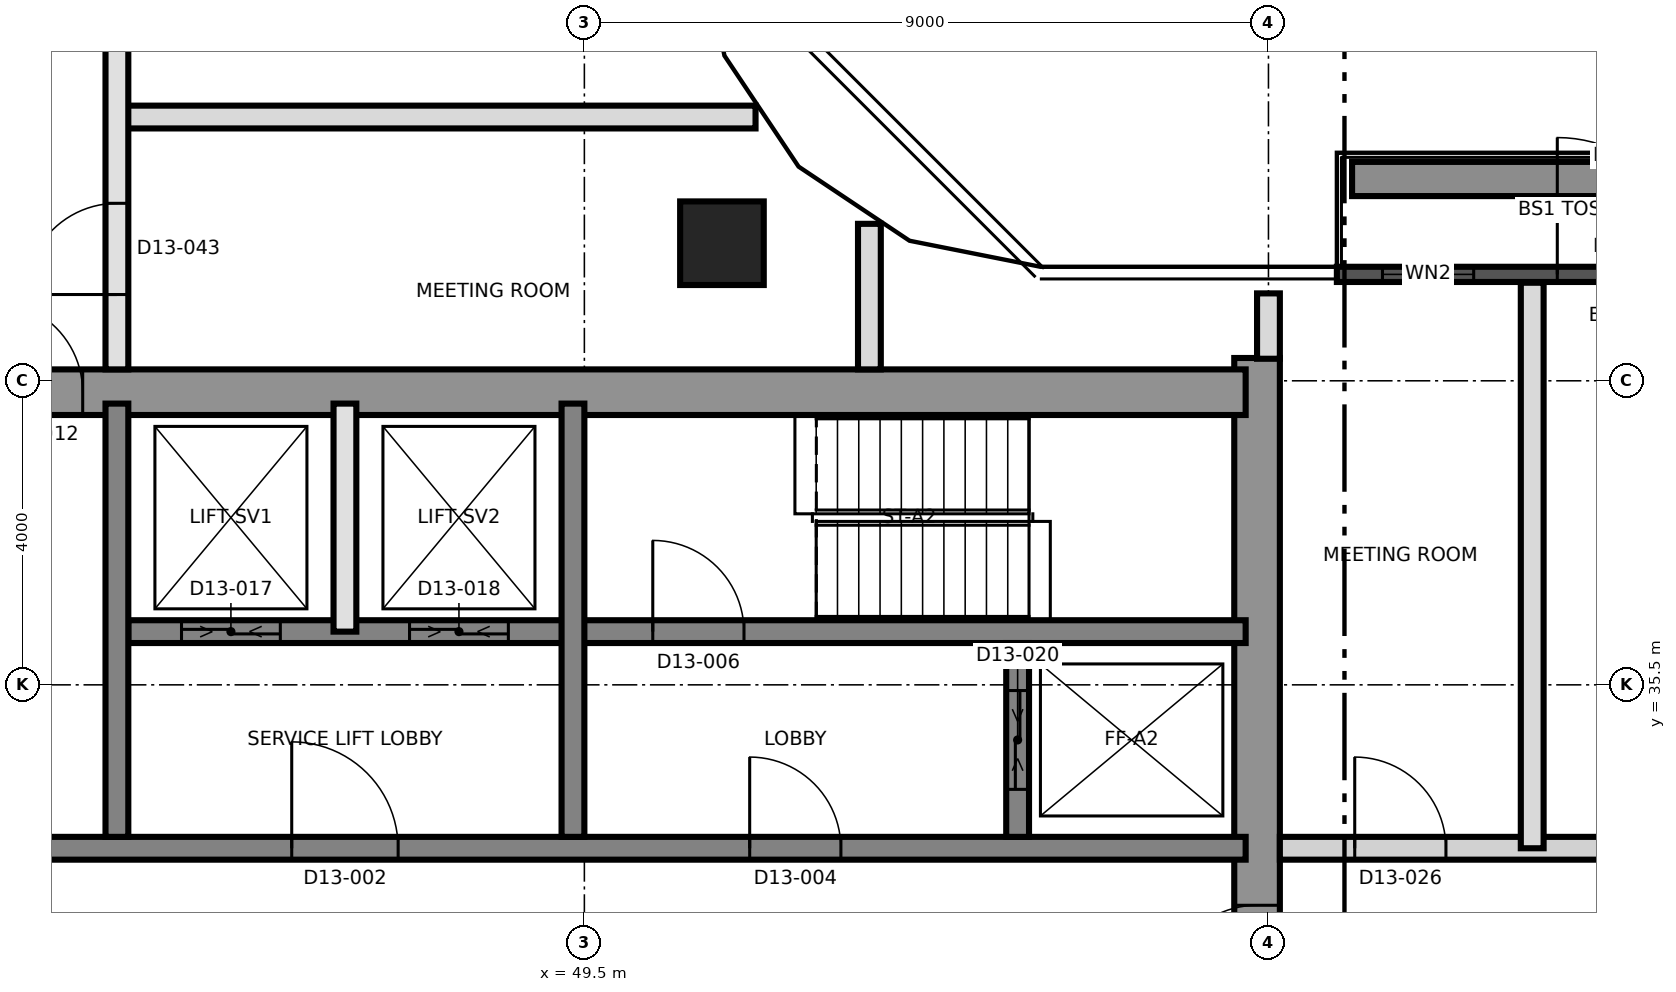
"""IFC4 building model, lengths in metres.
Left out: names, types, materials, properties, quantities, classifications, styles, units other than length and angle.
Written with IfcOpenShell. Run it as: python <this file> out.ifc"""

import sys

from ifc_helpers import new_model, si_unit, direction, frame, frame_2d, origin, origin_2d, place, context, subcontext, project, spatial, rectangle, extrude, element, fill, save


model = new_model("IFC4")
c1 = context("Model", 3, precision=1e-05, world=origin(), true_north=direction((0.0, 1.0)))
c2 = subcontext(c1, "Body", "Model", "MODEL_VIEW")
j1 = project(units=[si_unit("LENGTHUNIT", "METRE"), si_unit("PLANEANGLEUNIT", "RADIAN")], contexts=[c1])
p1 = place(None, origin())
s1 = spatial("IfcSite", under=j1, at=p1, CompositionType="ELEMENT")
p2 = place(p1, origin())
s2 = spatial("IfcBuilding", under=s1, at=p2, CompositionType="ELEMENT")
p3 = place(p2, frame((0.0, 0.0, 145.9)))
s3 = spatial("IfcBuildingStorey", under=s2, at=p3, CompositionType="ELEMENT", Elevation=145.9)
p4 = place(p3, frame((58.35, 21.2, 0.0), z_axis=(0.0, 0.0, 1.0), x_axis=(0.0, 1.0, 0.0)))
e1 = element("IfcWall", 1, at=p4, inside=s3, PredefinedType="SHEAR", context=c2, shape_type="SweptSolid", body=[
    extrude(rectangle(XDim=18.6, YDim=0.6, at=frame_2d((9.3, 0.0))), origin(), (0.0, 0.0, 1.0), 3.7),
])
p5 = place(p4, frame((10.2, 0.0, 0.0)))
e2 = element("IfcOpeningElement", 2, at=p5, cuts=e1, PredefinedType="OPENING", context=c2, shape_type="SweptSolid", body=[
    extrude(rectangle(XDim=1.2, YDim=2.1, at=frame_2d((0.6, 1.05))), frame((0.0, 0.31, 0.0), z_axis=(0.0, -1.0, 0.0), x_axis=(1.0, 0.0, 0.0)), (0.0, 0.0, 1.0), 0.62),
])
p6 = place(p3, frame((31.2, 39.35, 0.0), z_axis=(0.0, 0.0, 1.0), x_axis=(1.0, 0.0, 0.0)))
e3 = element("IfcWall", 3, at=p6, inside=s3, PredefinedType="SHEAR", context=c2, shape_type="SweptSolid", body=[
    extrude(rectangle(XDim=27.0, YDim=0.6, at=frame_2d((13.5, 0.0))), origin(), (0.0, 0.0, 1.0), 3.7),
])
p7 = place(p6, frame((10.5, 0.0, 0.0)))
e4 = element("IfcOpeningElement", 4, at=p7, cuts=e3, PredefinedType="OPENING", context=c2, shape_type="SweptSolid", body=[
    extrude(rectangle(XDim=1.2, YDim=2.1, at=frame_2d((0.6, 1.05))), frame((0.0, 0.31, 0.0), z_axis=(0.0, -1.0, 0.0), x_axis=(1.0, 0.0, 0.0)), (0.0, 0.0, 1.0), 0.62),
])
p8 = place(p3, frame((31.8, 33.35, 0.0), z_axis=(0.0, 0.0, 1.0), x_axis=(1.0, 0.0, 0.0)))
e5 = element("IfcWall", 5, at=p8, inside=s3, PredefinedType="SHEAR", context=c2, shape_type="SweptSolid", body=[
    extrude(rectangle(XDim=26.4, YDim=0.3, at=frame_2d((13.2, 0.0))), origin(), (0.0, 0.0, 1.0), 3.7),
])
p9 = place(p8, frame((13.85, 0.0, 0.0)))
e6 = element("IfcOpeningElement", 6, at=p9, cuts=e5, PredefinedType="OPENING", context=c2, shape_type="SweptSolid", body=[
    extrude(rectangle(XDim=1.4, YDim=2.1, at=frame_2d((0.7, 1.05))), frame((0.0, 0.16, 0.0), z_axis=(0.0, -1.0, 0.0), x_axis=(1.0, 0.0, 0.0)), (0.0, 0.0, 1.0), 0.32),
])
p10 = place(p8, frame((5.325, 0.0, 0.0)))
e7 = element("IfcOpeningElement", 7, at=p10, cuts=e5, PredefinedType="OPENING", context=c2, shape_type="SweptSolid", body=[
    extrude(rectangle(XDim=1.2, YDim=2.1, at=frame_2d((0.6, 1.05))), frame((0.0, 0.16, 0.0), z_axis=(0.0, -1.0, 0.0), x_axis=(1.0, 0.0, 0.0)), (0.0, 0.0, 1.0), 0.32),
])
p11 = place(p8, frame((19.875, 0.0, 0.0)))
e8 = element("IfcOpeningElement", 8, at=p11, cuts=e5, PredefinedType="OPENING", context=c2, shape_type="SweptSolid", body=[
    extrude(rectangle(XDim=1.2, YDim=2.1, at=frame_2d((0.6, 1.05))), frame((0.0, 0.16, 0.0), z_axis=(0.0, -1.0, 0.0), x_axis=(1.0, 0.0, 0.0)), (0.0, 0.0, 1.0), 0.32),
])
p12 = place(p3, frame((43.5, 36.2, 0.0), z_axis=(0.0, 0.0, 1.0), x_axis=(1.0, 0.0, 0.0)))
e9 = element("IfcWall", 9, at=p12, inside=s3, PredefinedType="SHEAR", context=c2, shape_type="SweptSolid", body=[
    extrude(rectangle(XDim=14.7, YDim=0.3, at=frame_2d((7.35, 0.0))), origin(), (0.0, 0.0, 1.0), 3.7),
])
p13 = place(p12, frame((6.9, 0.0, 0.0)))
e10 = element("IfcOpeningElement", 10, at=p13, cuts=e9, PredefinedType="OPENING", context=c2, shape_type="SweptSolid", body=[
    extrude(rectangle(XDim=1.2, YDim=2.1, at=frame_2d((0.6, 1.05))), frame((0.0, 0.16, 0.0), z_axis=(0.0, -1.0, 0.0), x_axis=(1.0, 0.0, 0.0)), (0.0, 0.0, 1.0), 0.32),
])
p14 = place(p12, frame((0.7, 0.0, 0.0)))
e11 = element("IfcOpeningElement", 11, at=p14, cuts=e9, PredefinedType="OPENING", context=c2, shape_type="SweptSolid", body=[
    extrude(rectangle(XDim=1.3, YDim=2.4, at=frame_2d((0.65, 1.2))), frame((0.0, 0.16, 0.0), z_axis=(0.0, -1.0, 0.0), x_axis=(1.0, 0.0, 0.0)), (0.0, 0.0, 1.0), 0.32),
])
p15 = place(p12, frame((3.7, 0.0, 0.0)))
e12 = element("IfcOpeningElement", 12, at=p15, cuts=e9, PredefinedType="OPENING", context=c2, shape_type="SweptSolid", body=[
    extrude(rectangle(XDim=1.3, YDim=2.4, at=frame_2d((0.65, 1.2))), frame((0.0, 0.16, 0.0), z_axis=(0.0, -1.0, 0.0), x_axis=(1.0, 0.0, 0.0)), (0.0, 0.0, 1.0), 0.32),
])
for number, where, z_axis, x_axis in (
    (13, (43.35, 33.5, 0.0), (0.0, 0.0, 1.0), (0.0, 1.0, 0.0)),
    (14, (49.35, 33.5, 0.0), (0.0, 0.0, 1.0), (0.0, 1.0, 0.0)),
):
    element("IfcWall", number, at=place(p3, frame(where, z_axis=z_axis, x_axis=x_axis)), inside=s3, PredefinedType="SHEAR", context=c2, shape_type="SweptSolid", body=[
        extrude(rectangle(XDim=5.7, YDim=0.3, at=frame_2d((2.85, 0.0))), origin(), (0.0, 0.0, 1.0), 3.7),
    ])
p16 = place(p3, frame((55.2, 33.5, 0.0), z_axis=(0.0, 0.0, 1.0), x_axis=(0.0, 1.0, 0.0)))
e15 = element("IfcWall", 15, at=p16, inside=s3, PredefinedType="SHEAR", context=c2, shape_type="SweptSolid", body=[
    extrude(rectangle(XDim=2.55, YDim=0.3, at=frame_2d((1.275, 0.0))), origin(), (0.0, 0.0, 1.0), 3.7),
])
p17 = place(p16, frame((0.625, 0.0, 0.0)))
e16 = element("IfcOpeningElement", 16, at=p17, cuts=e15, PredefinedType="OPENING", context=c2, shape_type="SweptSolid", body=[
    extrude(rectangle(XDim=1.3, YDim=2.4, at=frame_2d((0.65, 1.2))), frame((0.0, 0.16, 0.0), z_axis=(0.0, -1.0, 0.0), x_axis=(1.0, 0.0, 0.0)), (0.0, 0.0, 1.0), 0.32),
])
p18 = place(p3, frame((51.31, 41.31, 0.0), z_axis=(0.0, 0.0, 1.0), x_axis=(1.0, 0.0, 0.0)))
e17 = element("IfcColumn", 17, at=p18, inside=s3, PredefinedType="COLUMN", context=c2, shape_type="SweptSolid", body=[
    extrude(rectangle(XDim=1.1, YDim=1.1, at=origin_2d()), origin(), (0.0, 0.0, 1.0), 3.7),
])
p19 = place(p3, frame((63.0, 42.155, 0.0), z_axis=(0.0, 0.0, 1.0), x_axis=(1.0, 0.0, 0.0)))
e18 = element("IfcWall", 18, at=p19, inside=s3, PredefinedType="SOLIDWALL", context=c2, shape_type="SweptSolid", body=[
    extrude(rectangle(XDim=6.8, YDim=0.45, at=origin_2d()), origin(), (0.0, 0.0, 1.0), 1.0),
])
p20 = place(p3, frame((59.4, 40.9, 0.0), z_axis=(0.0, 0.0, 1.0), x_axis=(1.0, 0.0, 0.0)))
e19 = element("IfcWall", 19, at=p20, inside=s3, PredefinedType="SOLIDWALL", context=c2, shape_type="SweptSolid", body=[
    extrude(rectangle(XDim=7.2, YDim=0.2, at=frame_2d((3.6, 0.0))), origin(), (0.0, 0.0, 1.0), 3.4),
])
p21 = place(p20, frame((2.9, 0.0, 0.0)))
e20 = element("IfcOpeningElement", 20, at=p21, cuts=e19, PredefinedType="OPENING", context=c2, shape_type="SweptSolid", body=[
    extrude(rectangle(XDim=1.8, YDim=2.4, at=frame_2d((0.9, 1.2))), frame((0.0, 0.11, 0.0), z_axis=(0.0, -1.0, 0.0), x_axis=(1.0, 0.0, 0.0)), (0.0, 0.0, 1.0), 0.22),
])
p22 = place(p20, frame((5.4, 0.0, 0.9)))
e21 = element("IfcOpeningElement", 21, at=p22, cuts=e19, PredefinedType="OPENING", context=c2, shape_type="SweptSolid", body=[
    extrude(rectangle(XDim=1.2, YDim=2.1, at=frame_2d((0.6, 1.05))), frame((0.0, 0.11, 0.0), z_axis=(0.0, -1.0, 0.0), x_axis=(1.0, 0.0, 0.0)), (0.0, 0.0, 1.0), 0.22),
])
p23 = place(p20, frame((0.6, 0.0, 0.9)))
e22 = element("IfcOpeningElement", 22, at=p23, cuts=e19, PredefinedType="OPENING", context=c2, shape_type="SweptSolid", body=[
    extrude(rectangle(XDim=1.2, YDim=2.1, at=frame_2d((0.6, 1.05))), frame((0.0, 0.11, 0.0), z_axis=(0.0, -1.0, 0.0), x_axis=(1.0, 0.0, 0.0)), (0.0, 0.0, 1.0), 0.22),
])
p24 = place(p3, frame((46.35, 36.2, 0.0), z_axis=(0.0, 0.0, 1.0), x_axis=(0.0, 1.0, 0.0)))
e23 = element("IfcWall", 23, at=p24, inside=s3, PredefinedType="SOLIDWALL", context=c2, shape_type="SweptSolid", body=[
    extrude(rectangle(XDim=3.0, YDim=0.3, at=frame_2d((1.5, 0.0))), origin(), (0.0, 0.0, 1.0), 3.4),
])
p25 = place(p3, frame((58.65, 33.35, 0.0), z_axis=(0.0, 0.0, 1.0), x_axis=(1.0, 0.0, 0.0)))
e24 = element("IfcWall", 24, at=p25, inside=s3, PredefinedType="PARTITIONING", context=c2, shape_type="SweptSolid", body=[
    extrude(rectangle(XDim=26.68, YDim=0.3, at=frame_2d((13.34, 0.0))), origin(), (0.0, 0.0, 1.0), 3.3),
])
p26 = place(p25, frame((0.985, 0.0, 0.0)))
e25 = element("IfcOpeningElement", 25, at=p26, cuts=e24, PredefinedType="OPENING", context=c2, shape_type="SweptSolid", body=[
    extrude(rectangle(XDim=1.2, YDim=2.1, at=frame_2d((0.6, 1.05))), frame((0.0, 0.16, 0.0), z_axis=(0.0, -1.0, 0.0), x_axis=(1.0, 0.0, 0.0)), (0.0, 0.0, 1.0), 0.32),
])
p27 = place(p25, frame((4.235, 0.0, 0.0)))
e26 = element("IfcOpeningElement", 26, at=p27, cuts=e24, PredefinedType="OPENING", context=c2, shape_type="SweptSolid", body=[
    extrude(rectangle(XDim=1.0, YDim=2.1, at=frame_2d((0.5, 1.05))), frame((0.0, 0.16, 0.0), z_axis=(0.0, -1.0, 0.0), x_axis=(1.0, 0.0, 0.0)), (0.0, 0.0, 1.0), 0.32),
])
p28 = place(p25, frame((12.265, 0.0, 0.0)))
e27 = element("IfcOpeningElement", 27, at=p28, cuts=e24, PredefinedType="OPENING", context=c2, shape_type="SweptSolid", body=[
    extrude(rectangle(XDim=1.0, YDim=2.1, at=frame_2d((0.5, 1.05))), frame((0.0, 0.16, 0.0), z_axis=(0.0, -1.0, 0.0), x_axis=(1.0, 0.0, 0.0)), (0.0, 0.0, 1.0), 0.32),
])
p29 = place(p25, frame((15.215, 0.0, 0.0)))
e28 = element("IfcOpeningElement", 28, at=p29, cuts=e24, PredefinedType="OPENING", context=c2, shape_type="SweptSolid", body=[
    extrude(rectangle(XDim=1.4, YDim=2.1, at=frame_2d((0.7, 1.05))), frame((0.0, 0.16, 0.0), z_axis=(0.0, -1.0, 0.0), x_axis=(1.0, 0.0, 0.0)), (0.0, 0.0, 1.0), 0.32),
])
p30 = place(p25, frame((20.2, 0.0, 0.0)))
e29 = element("IfcOpeningElement", 29, at=p30, cuts=e24, PredefinedType="OPENING", context=c2, shape_type="SweptSolid", body=[
    extrude(rectangle(XDim=1.0, YDim=2.4, at=frame_2d((0.5, 1.2))), frame((0.0, 0.16, 0.0), z_axis=(0.0, -1.0, 0.0), x_axis=(1.0, 0.0, 0.0)), (0.0, 0.0, 1.0), 0.32),
])
p31 = place(p3, frame((43.35, 42.97, 0.0), z_axis=(0.0, 0.0, 1.0), x_axis=(1.0, 0.0, 0.0)))
e30 = element("IfcWall", 30, at=p31, inside=s3, PredefinedType="PARTITIONING", context=c2, shape_type="SweptSolid", body=[
    extrude(rectangle(XDim=8.402, YDim=0.3, at=frame_2d((4.201, 0.0))), origin(), (0.0, 0.0, 1.0), 3.4),
])
p32 = place(p3, frame((43.35, 39.65, 0.0), z_axis=(0.0, 0.0, 1.0), x_axis=(0.0, 1.0, 0.0)))
e31 = element("IfcWall", 31, at=p32, inside=s3, PredefinedType="SOLIDWALL", context=c2, shape_type="SweptSolid", body=[
    extrude(rectangle(XDim=26.15, YDim=0.3, at=frame_2d((13.075, 0.0))), origin(), (0.0, 0.0, 1.0), 3.4),
])
p33 = place(p32, frame((0.985, 0.0, 0.0)))
e32 = element("IfcOpeningElement", 32, at=p33, cuts=e31, PredefinedType="OPENING", context=c2, shape_type="SweptSolid", body=[
    extrude(rectangle(XDim=1.2, YDim=2.1, at=frame_2d((0.6, 1.05))), frame((0.0, 0.16, 0.0), z_axis=(0.0, -1.0, 0.0), x_axis=(1.0, 0.0, 0.0)), (0.0, 0.0, 1.0), 0.32),
])
p34 = place(p32, frame((4.235, 0.0, 0.0)))
e33 = element("IfcOpeningElement", 33, at=p34, cuts=e31, PredefinedType="OPENING", context=c2, shape_type="SweptSolid", body=[
    extrude(rectangle(XDim=1.0, YDim=2.1, at=frame_2d((0.5, 1.05))), frame((0.0, 0.16, 0.0), z_axis=(0.0, -1.0, 0.0), x_axis=(1.0, 0.0, 0.0)), (0.0, 0.0, 1.0), 0.32),
])
p35 = place(p32, frame((14.5, 0.0, 0.0)))
e34 = element("IfcOpeningElement", 34, at=p35, cuts=e31, PredefinedType="OPENING", context=c2, shape_type="SweptSolid", body=[
    extrude(rectangle(XDim=1.0, YDim=2.4, at=frame_2d((0.5, 1.2))), frame((0.0, 0.16, 0.0), z_axis=(0.0, -1.0, 0.0), x_axis=(1.0, 0.0, 0.0)), (0.0, 0.0, 1.0), 0.32),
])
p36 = place(p32, frame((21.4, 0.0, 0.0)))
e35 = element("IfcOpeningElement", 35, at=p36, cuts=e31, PredefinedType="OPENING", context=c2, shape_type="SweptSolid", body=[
    extrude(rectangle(XDim=1.0, YDim=2.4, at=frame_2d((0.5, 1.2))), frame((0.0, 0.16, 0.0), z_axis=(0.0, -1.0, 0.0), x_axis=(1.0, 0.0, 0.0)), (0.0, 0.0, 1.0), 0.32),
])
p37 = place(p3, frame((53.25, 39.65, 0.0), z_axis=(0.0, 0.0, 1.0), x_axis=(0.0, 1.0, 0.0)))
e36 = element("IfcWall", 36, at=p37, inside=s3, PredefinedType="PARTITIONING", context=c2, shape_type="SweptSolid", body=[
    extrude(rectangle(XDim=1.915, YDim=0.3, at=frame_2d((0.958, 0.0))), origin(), (0.0, 0.0, 1.0), 3.4),
])
p38 = place(p3, frame((58.5, 39.79, 0.0), z_axis=(0.0, 0.0, 1.0), x_axis=(0.0, 1.0, 0.0)))
e37 = element("IfcWall", 37, at=p38, inside=s3, PredefinedType="PARTITIONING", context=c2, shape_type="SweptSolid", body=[
    extrude(rectangle(XDim=0.86, YDim=0.3, at=frame_2d((0.43, 0.0))), origin(), (0.0, 0.0, 1.0), 3.4),
])
p39 = place(p3, frame((61.97, 33.35, 0.0), z_axis=(0.0, 0.0, 1.0), x_axis=(0.0, 1.0, 0.0)))
e38 = element("IfcWall", 38, at=p39, inside=s3, PredefinedType="PARTITIONING", context=c2, shape_type="SweptSolid", body=[
    extrude(rectangle(XDim=7.44, YDim=0.3, at=frame_2d((3.72, 0.0))), origin(), (0.0, 0.0, 1.0), 3.4),
])
p40 = place(p21, origin())
e39 = element("IfcDoor", 39, at=p40, inside=s3, OperationType="SINGLE_SWING_LEFT", PredefinedType="DOOR", context=c2, shape_type="SweptSolid", body=[
    extrude(rectangle(XDim=1.8, YDim=2.4, at=frame_2d((0.9, 1.2))), frame((0.0, 0.025, 0.0), z_axis=(0.0, -1.0, 0.0), x_axis=(1.0, 0.0, 0.0)), (0.0, 0.0, 1.0), 0.05),
])
fill(e20, e39)
p41 = place(p23, origin())
e40 = element("IfcWindow", 40, at=p41, inside=s3, PartitioningType="SINGLE_PANEL", PredefinedType="WINDOW", context=c2, shape_type="SweptSolid", body=[
    extrude(rectangle(XDim=1.2, YDim=2.1, at=frame_2d((0.6, 1.05))), frame((0.0, 0.03, 0.0), z_axis=(0.0, -1.0, 0.0), x_axis=(1.0, 0.0, 0.0)), (0.0, 0.0, 1.0), 0.06),
])
fill(e22, e40)
p42 = place(p9, origin())
e41 = element("IfcDoor", 41, at=p42, inside=s3, OperationType="SINGLE_SWING_RIGHT", PredefinedType="DOOR", context=c2, shape_type="SweptSolid", body=[
    extrude(rectangle(XDim=1.4, YDim=2.1, at=frame_2d((0.7, 1.05))), frame((0.0, 0.025, 0.0), z_axis=(0.0, -1.0, 0.0), x_axis=(1.0, 0.0, 0.0)), (0.0, 0.0, 1.0), 0.05),
])
fill(e6, e41)
p43 = place(p11, origin())
e42 = element("IfcDoor", 42, at=p43, inside=s3, OperationType="SINGLE_SWING_RIGHT", PredefinedType="DOOR", context=c2, shape_type="SweptSolid", body=[
    extrude(rectangle(XDim=1.2, YDim=2.1, at=frame_2d((0.6, 1.05))), frame((0.0, 0.025, 0.0), z_axis=(0.0, -1.0, 0.0), x_axis=(1.0, 0.0, 0.0)), (0.0, 0.0, 1.0), 0.05),
])
fill(e8, e42)
p44 = place(p13, origin())
e43 = element("IfcDoor", 43, at=p44, inside=s3, OperationType="SINGLE_SWING_LEFT", PredefinedType="DOOR", context=c2, shape_type="SweptSolid", body=[
    extrude(rectangle(XDim=1.2, YDim=2.1, at=frame_2d((0.6, 1.05))), frame((0.0, 0.025, 0.0), z_axis=(0.0, -1.0, 0.0), x_axis=(1.0, 0.0, 0.0)), (0.0, 0.0, 1.0), 0.05),
])
fill(e10, e43)
p45 = place(p5, origin())
e44 = element("IfcDoor", 44, at=p45, inside=s3, OperationType="SINGLE_SWING_LEFT", PredefinedType="DOOR", context=c2, shape_type="SweptSolid", body=[
    extrude(rectangle(XDim=1.2, YDim=2.1, at=frame_2d((0.6, 1.05))), frame((0.0, 0.025, 0.0), z_axis=(0.0, -1.0, 0.0), x_axis=(1.0, 0.0, 0.0)), (0.0, 0.0, 1.0), 0.05),
])
fill(e2, e44)
p46 = place(p7, origin())
e45 = element("IfcDoor", 45, at=p46, inside=s3, OperationType="SINGLE_SWING_RIGHT", PredefinedType="DOOR", context=c2, shape_type="SweptSolid", body=[
    extrude(rectangle(XDim=1.2, YDim=2.1, at=frame_2d((0.6, 1.05))), frame((0.0, 0.025, 0.0), z_axis=(0.0, -1.0, 0.0), x_axis=(1.0, 0.0, 0.0)), (0.0, 0.0, 1.0), 0.05),
])
fill(e4, e45)
p47 = place(p14, origin())
e46 = element("IfcDoor", 46, at=p47, inside=s3, OperationType="SLIDING_TO_LEFT", PredefinedType="DOOR", context=c2, shape_type="SweptSolid", body=[
    extrude(rectangle(XDim=1.3, YDim=2.4, at=frame_2d((0.65, 1.2))), frame((0.0, 0.025, 0.0), z_axis=(0.0, -1.0, 0.0), x_axis=(1.0, 0.0, 0.0)), (0.0, 0.0, 1.0), 0.05),
])
fill(e11, e46)
p48 = place(p15, origin())
e47 = element("IfcDoor", 47, at=p48, inside=s3, OperationType="SLIDING_TO_LEFT", PredefinedType="DOOR", context=c2, shape_type="SweptSolid", body=[
    extrude(rectangle(XDim=1.3, YDim=2.4, at=frame_2d((0.65, 1.2))), frame((0.0, 0.025, 0.0), z_axis=(0.0, -1.0, 0.0), x_axis=(1.0, 0.0, 0.0)), (0.0, 0.0, 1.0), 0.05),
])
fill(e12, e47)
p49 = place(p17, origin())
e48 = element("IfcDoor", 48, at=p49, inside=s3, OperationType="SLIDING_TO_LEFT", PredefinedType="DOOR", context=c2, shape_type="SweptSolid", body=[
    extrude(rectangle(XDim=1.3, YDim=2.4, at=frame_2d((0.65, 1.2))), frame((0.0, 0.025, 0.0), z_axis=(0.0, -1.0, 0.0), x_axis=(1.0, 0.0, 0.0)), (0.0, 0.0, 1.0), 0.05),
])
fill(e16, e48)
p50 = place(p26, origin())
e49 = element("IfcDoor", 49, at=p50, inside=s3, OperationType="SINGLE_SWING_LEFT", PredefinedType="DOOR", context=c2, shape_type="SweptSolid", body=[
    extrude(rectangle(XDim=1.2, YDim=2.1, at=frame_2d((0.6, 1.05))), frame((0.0, 0.025, 0.0), z_axis=(0.0, -1.0, 0.0), x_axis=(1.0, 0.0, 0.0)), (0.0, 0.0, 1.0), 0.05),
])
fill(e25, e49)
p51 = place(p33, origin())
e50 = element("IfcDoor", 50, at=p51, inside=s3, OperationType="SINGLE_SWING_RIGHT", PredefinedType="DOOR", context=c2, shape_type="SweptSolid", body=[
    extrude(rectangle(XDim=1.2, YDim=2.1, at=frame_2d((0.6, 1.05))), frame((0.0, 0.025, 0.0), z_axis=(0.0, -1.0, 0.0), x_axis=(1.0, 0.0, 0.0)), (0.0, 0.0, 1.0), 0.05),
])
fill(e32, e50)
save(model, sys.argv[1])
